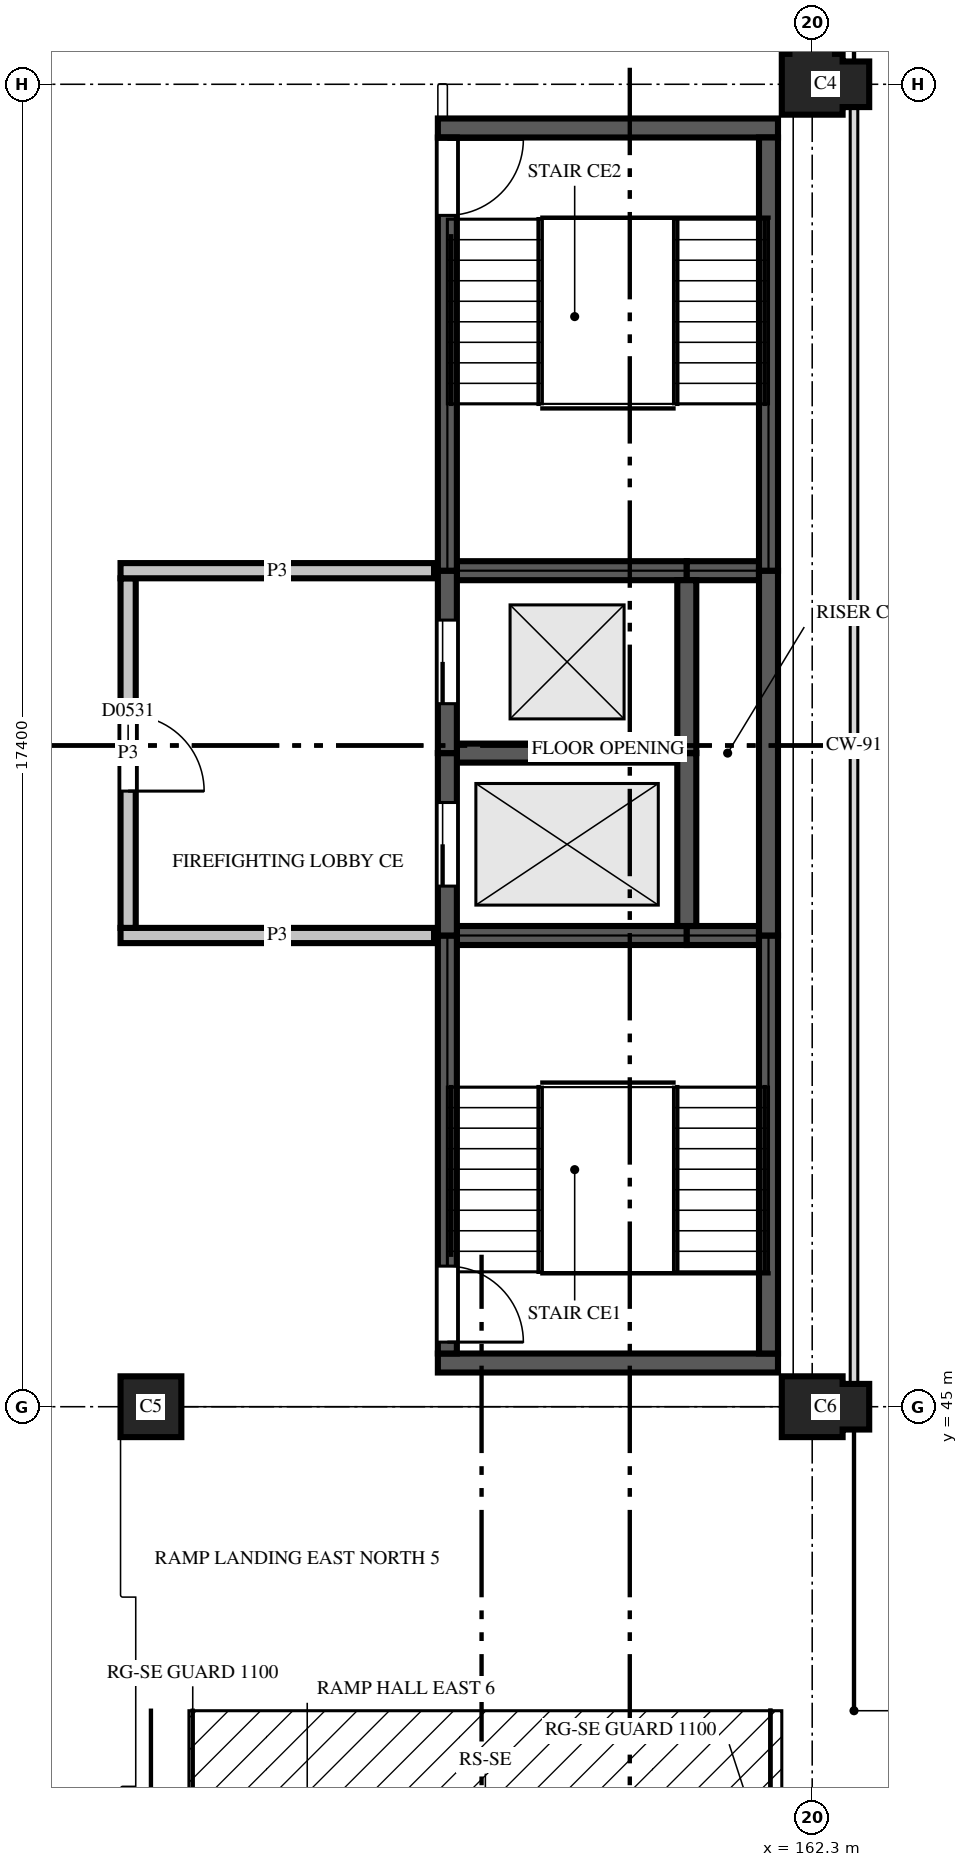
"""IFC4 building model, lengths in metres.
Left out: names, types, materials, properties, quantities, classifications, styles, units other than length and angle.
Written with IfcOpenShell. Run it as: python <this file> out.ifc"""

import sys

from ifc_helpers import new_model, si_unit, direction, frame, frame_2d, origin, place, context, subcontext, project, spatial, polyline, rectangle, outline, extrude, element, fill, save


model = new_model("IFC4")
c1 = context("Model", 3, precision=1e-05, world=origin(), true_north=direction((0.0, 1.0)))
c2 = subcontext(c1, "Body", "Model", "MODEL_VIEW")
j1 = project(units=[si_unit("LENGTHUNIT", "METRE"), si_unit("PLANEANGLEUNIT", "RADIAN")], contexts=[c1])
p1 = place(None, origin())
s1 = spatial("IfcSite", under=j1, at=p1, CompositionType="ELEMENT")
p2 = place(p1, origin())
s2 = spatial("IfcBuilding", under=s1, at=p2, CompositionType="ELEMENT")
p3 = place(p2, frame((0.0, 0.0, 19.3)))
s3 = spatial("IfcBuildingStorey", under=s2, at=p3, CompositionType="ELEMENT", Elevation=19.3)
p4 = place(p3, frame((153.6, 45.0, 0.0), z_axis=(0.0, 0.0, 1.0), x_axis=(1.0, 0.0, 0.0)))
e1 = element("IfcColumn", 1, at=p4, inside=s3, PredefinedType="COLUMN", context=c2, shape_type="SweptSolid", body=[
    extrude(outline(polyline([(-0.4, -0.4), (0.4, -0.4), (0.4, 0.4), (-0.4, 0.4), (-0.4, -0.4)])), origin(), (0.0, 0.0, 1.0), 3.7),
])
p5 = place(p3, frame((162.3, 45.0, 0.0), z_axis=(0.0, 0.0, 1.0), x_axis=(1.0, 0.0, 0.0)))
e2 = element("IfcColumn", 2, at=p5, inside=s3, PredefinedType="COLUMN", context=c2, shape_type="SweptSolid", body=[
    extrude(outline(polyline([(-0.4, -0.4), (0.4, -0.4), (0.4, -0.3), (0.75, -0.3), (0.75, 0.3), (0.4, 0.3), (0.4, 0.4), (-0.4, 0.4), (-0.4, -0.4)])), origin(), (0.0, 0.0, 1.0), 3.7),
])
p6 = place(p3, frame((162.3, 62.4, 0.0), z_axis=(0.0, 0.0, 1.0), x_axis=(1.0, 0.0, 0.0)))
e3 = element("IfcColumn", 3, at=p6, inside=s3, PredefinedType="COLUMN", context=c2, shape_type="SweptSolid", body=[
    extrude(outline(polyline([(-0.4, -0.4), (0.4, -0.4), (0.4, -0.3), (0.75, -0.3), (0.75, 0.3), (0.4, 0.3), (0.4, 0.4), (0.3, 0.4), (0.3, 0.75), (-0.3, 0.75), (-0.3, 0.4), (-0.4, 0.4), (-0.4, -0.4)])), origin(), (0.0, 0.0, 1.0), 3.7),
])
p7 = place(p3, frame((157.375, 45.575, 0.0), z_axis=(0.0, 0.0, 1.0), x_axis=(1.0, 0.0, 0.0)))
e4 = element("IfcWall", 4, at=p7, inside=s3, PredefinedType="SHEAR", context=c2, shape_type="SweptSolid", body=[
    extrude(rectangle(XDim=4.475, YDim=0.25, at=frame_2d((2.238, 0.0))), origin(), (0.0, 0.0, 1.0), 3.7),
])
p8 = place(p3, frame((157.625, 51.2, 0.0), z_axis=(0.0, 0.0, 1.0), x_axis=(1.0, 0.0, 0.0)))
e5 = element("IfcWall", 5, at=p8, inside=s3, PredefinedType="SHEAR", context=c2, shape_type="SweptSolid", body=[
    extrude(rectangle(XDim=3.025, YDim=0.25, at=frame_2d((1.512, 0.0))), origin(), (0.0, 0.0, 1.0), 3.7),
])
p9 = place(p3, frame((160.65, 51.2, 0.0), z_axis=(0.0, 0.0, 1.0), x_axis=(1.0, 0.0, 0.0)))
e6 = element("IfcWall", 6, at=p9, inside=s3, PredefinedType="SHEAR", context=c2, shape_type="SweptSolid", body=[
    extrude(rectangle(XDim=0.95, YDim=0.25, at=frame_2d((0.475, 0.0))), origin(), (0.0, 0.0, 1.0), 3.7),
])
p10 = place(p3, frame((157.625, 53.6, 0.0), z_axis=(0.0, 0.0, 1.0), x_axis=(1.0, 0.0, 0.0)))
e7 = element("IfcWall", 7, at=p10, inside=s3, PredefinedType="SHEAR", context=c2, shape_type="SweptSolid", body=[
    extrude(rectangle(XDim=2.9, YDim=0.25, at=frame_2d((1.45, 0.0))), origin(), (0.0, 0.0, 1.0), 3.7),
])
p11 = place(p3, frame((157.625, 56.0, 0.0), z_axis=(0.0, 0.0, 1.0), x_axis=(1.0, 0.0, 0.0)))
e8 = element("IfcWall", 8, at=p11, inside=s3, PredefinedType="SHEAR", context=c2, shape_type="SweptSolid", body=[
    extrude(rectangle(XDim=3.025, YDim=0.25, at=frame_2d((1.512, 0.0))), origin(), (0.0, 0.0, 1.0), 3.7),
])
p12 = place(p3, frame((160.65, 56.0, 0.0), z_axis=(0.0, 0.0, 1.0), x_axis=(1.0, 0.0, 0.0)))
e9 = element("IfcWall", 9, at=p12, inside=s3, PredefinedType="SHEAR", context=c2, shape_type="SweptSolid", body=[
    extrude(rectangle(XDim=0.95, YDim=0.25, at=frame_2d((0.475, 0.0))), origin(), (0.0, 0.0, 1.0), 3.7),
])
p13 = place(p3, frame((157.375, 61.825, 0.0), z_axis=(0.0, 0.0, 1.0), x_axis=(1.0, 0.0, 0.0)))
e10 = element("IfcWall", 10, at=p13, inside=s3, PredefinedType="SHEAR", context=c2, shape_type="SweptSolid", body=[
    extrude(rectangle(XDim=4.475, YDim=0.25, at=frame_2d((2.238, 0.0))), origin(), (0.0, 0.0, 1.0), 3.7),
])
p14 = place(p3, frame((157.5, 45.7, 0.0), z_axis=(0.0, 0.0, 1.0), x_axis=(0.0, 1.0, 0.0)))
e11 = element("IfcWall", 11, at=p14, inside=s3, PredefinedType="SHEAR", context=c2, shape_type="SweptSolid", body=[
    extrude(rectangle(XDim=5.5, YDim=0.25, at=frame_2d((2.75, 0.0))), origin(), (0.0, 0.0, 1.0), 3.7),
])
p15 = place(p14, frame((0.15, 0.0, 0.0)))
e12 = element("IfcOpeningElement", 12, at=p15, cuts=e11, PredefinedType="OPENING", context=c2, shape_type="SweptSolid", body=[
    extrude(rectangle(XDim=1.0, YDim=2.1, at=frame_2d((0.5, 1.05))), frame((0.0, 0.135, 0.0), z_axis=(0.0, -1.0, 0.0), x_axis=(1.0, 0.0, 0.0)), (0.0, 0.0, 1.0), 0.27),
])
p16 = place(p3, frame((157.5, 51.2, 0.0), z_axis=(0.0, 0.0, 1.0), x_axis=(0.0, 1.0, 0.0)))
e13 = element("IfcWall", 13, at=p16, inside=s3, PredefinedType="SHEAR", context=c2, shape_type="SweptSolid", body=[
    extrude(rectangle(XDim=2.4, YDim=0.25, at=frame_2d((1.2, 0.0))), origin(), (0.0, 0.0, 1.0), 3.7),
])
p17 = place(p16, frame((0.65, 0.0, 0.0)))
e14 = element("IfcOpeningElement", 14, at=p17, cuts=e13, PredefinedType="OPENING", context=c2, shape_type="SweptSolid", body=[
    extrude(rectangle(XDim=1.1, YDim=2.1, at=frame_2d((0.55, 1.05))), frame((0.0, 0.135, 0.0), z_axis=(0.0, -1.0, 0.0), x_axis=(1.0, 0.0, 0.0)), (0.0, 0.0, 1.0), 0.27),
])
p18 = place(p3, frame((157.5, 53.6, 0.0), z_axis=(0.0, 0.0, 1.0), x_axis=(0.0, 1.0, 0.0)))
e15 = element("IfcWall", 15, at=p18, inside=s3, PredefinedType="SHEAR", context=c2, shape_type="SweptSolid", body=[
    extrude(rectangle(XDim=2.4, YDim=0.25, at=frame_2d((1.2, 0.0))), origin(), (0.0, 0.0, 1.0), 3.7),
])
p19 = place(p18, frame((0.65, 0.0, 0.0)))
e16 = element("IfcOpeningElement", 16, at=p19, cuts=e15, PredefinedType="OPENING", context=c2, shape_type="SweptSolid", body=[
    extrude(rectangle(XDim=1.1, YDim=2.1, at=frame_2d((0.55, 1.05))), frame((0.0, 0.135, 0.0), z_axis=(0.0, -1.0, 0.0), x_axis=(1.0, 0.0, 0.0)), (0.0, 0.0, 1.0), 0.27),
])
p20 = place(p3, frame((157.5, 56.0, 0.0), z_axis=(0.0, 0.0, 1.0), x_axis=(0.0, 1.0, 0.0)))
e17 = element("IfcWall", 17, at=p20, inside=s3, PredefinedType="SHEAR", context=c2, shape_type="SweptSolid", body=[
    extrude(rectangle(XDim=5.7, YDim=0.25, at=frame_2d((2.85, 0.0))), origin(), (0.0, 0.0, 1.0), 3.7),
])
p21 = place(p20, frame((4.675, 0.0, 0.0)))
e18 = element("IfcOpeningElement", 18, at=p21, cuts=e17, PredefinedType="OPENING", context=c2, shape_type="SweptSolid", body=[
    extrude(rectangle(XDim=1.0, YDim=2.1, at=frame_2d((0.5, 1.05))), frame((0.0, 0.135, 0.0), z_axis=(0.0, -1.0, 0.0), x_axis=(1.0, 0.0, 0.0)), (0.0, 0.0, 1.0), 0.27),
])
p22 = place(p3, frame((160.65, 51.325, 0.0), z_axis=(0.0, 0.0, 1.0), x_axis=(0.0, 1.0, 0.0)))
e19 = element("IfcWall", 19, at=p22, inside=s3, PredefinedType="SHEAR", context=c2, shape_type="SweptSolid", body=[
    extrude(rectangle(XDim=2.275, YDim=0.25, at=frame_2d((1.138, 0.0))), origin(), (0.0, 0.0, 1.0), 3.7),
])
p23 = place(p3, frame((160.65, 53.6, 0.0), z_axis=(0.0, 0.0, 1.0), x_axis=(0.0, 1.0, 0.0)))
e20 = element("IfcWall", 20, at=p23, inside=s3, PredefinedType="SHEAR", context=c2, shape_type="SweptSolid", body=[
    extrude(rectangle(XDim=2.275, YDim=0.25, at=frame_2d((1.137, 0.0))), origin(), (0.0, 0.0, 1.0), 3.7),
])
p24 = place(p3, frame((161.725, 45.7, 0.0), z_axis=(0.0, 0.0, 1.0), x_axis=(0.0, 1.0, 0.0)))
e21 = element("IfcWall", 21, at=p24, inside=s3, PredefinedType="SHEAR", context=c2, shape_type="SweptSolid", body=[
    extrude(rectangle(XDim=5.5, YDim=0.25, at=frame_2d((2.75, 0.0))), origin(), (0.0, 0.0, 1.0), 3.7),
])
p25 = place(p3, frame((161.725, 51.2, 0.0), z_axis=(0.0, 0.0, 1.0), x_axis=(0.0, 1.0, 0.0)))
e22 = element("IfcWall", 22, at=p25, inside=s3, PredefinedType="SHEAR", context=c2, shape_type="SweptSolid", body=[
    extrude(rectangle(XDim=4.8, YDim=0.25, at=frame_2d((2.4, 0.0))), origin(), (0.0, 0.0, 1.0), 3.7),
])
p26 = place(p3, frame((161.725, 56.0, 0.0), z_axis=(0.0, 0.0, 1.0), x_axis=(0.0, 1.0, 0.0)))
e23 = element("IfcWall", 23, at=p26, inside=s3, PredefinedType="SHEAR", context=c2, shape_type="SweptSolid", body=[
    extrude(rectangle(XDim=5.7, YDim=0.25, at=frame_2d((2.85, 0.0))), origin(), (0.0, 0.0, 1.0), 3.7),
])
p27 = place(p3, frame((153.2, 51.2, 0.0), z_axis=(0.0, 0.0, 1.0), x_axis=(1.0, 0.0, 0.0)))
e24 = element("IfcWall", 24, at=p27, inside=s3, PredefinedType="PARTITIONING", context=c2, shape_type="SweptSolid", body=[
    extrude(rectangle(XDim=4.125, YDim=0.2, at=frame_2d((2.062, 0.0))), origin(), (0.0, 0.0, 1.0), 2.88),
])
p28 = place(p3, frame((153.3, 55.9, 0.0), z_axis=(0.0, 0.0, 1.0), x_axis=(0.0, -1.0, 0.0)))
e25 = element("IfcWall", 25, at=p28, inside=s3, PredefinedType="PARTITIONING", context=c2, shape_type="SweptSolid", body=[
    extrude(rectangle(XDim=4.6, YDim=0.2, at=frame_2d((2.3, 0.0))), origin(), (0.0, 0.0, 1.0), 2.88),
])
p29 = place(p28, frame((1.8, 0.0, 0.0)))
e26 = element("IfcOpeningElement", 26, at=p29, cuts=e25, PredefinedType="OPENING", context=c2, shape_type="SweptSolid", body=[
    extrude(rectangle(XDim=1.0, YDim=2.1, at=frame_2d((0.5, 1.05))), frame((0.0, 0.11, 0.0), z_axis=(0.0, -1.0, 0.0), x_axis=(1.0, 0.0, 0.0)), (0.0, 0.0, 1.0), 0.22),
])
p30 = place(p3, frame((157.325, 56.0, 0.0), z_axis=(0.0, 0.0, 1.0), x_axis=(-1.0, 0.0, 0.0)))
e27 = element("IfcWall", 27, at=p30, inside=s3, PredefinedType="PARTITIONING", context=c2, shape_type="SweptSolid", body=[
    extrude(rectangle(XDim=4.125, YDim=0.2, at=frame_2d((2.062, 0.0))), origin(), (0.0, 0.0, 1.0), 2.88),
])
p31 = place(p29, origin())
e28 = element("IfcDoor", 28, at=p31, inside=s3, OperationType="SINGLE_SWING_LEFT", PredefinedType="DOOR", context=c2, shape_type="SweptSolid", body=[
    extrude(rectangle(XDim=1.0, YDim=2.1, at=frame_2d((0.5, 1.05))), frame((0.0, 0.025, 0.0), z_axis=(0.0, -1.0, 0.0), x_axis=(1.0, 0.0, 0.0)), (0.0, 0.0, 1.0), 0.05),
])
fill(e26, e28)
p32 = place(p17, origin())
e29 = element("IfcDoor", 29, at=p32, inside=s3, OperationType="SLIDING_TO_LEFT", PredefinedType="DOOR", context=c2, shape_type="SweptSolid", body=[
    extrude(rectangle(XDim=1.1, YDim=2.1, at=frame_2d((0.55, 1.05))), frame((0.0, 0.025, 0.0), z_axis=(0.0, -1.0, 0.0), x_axis=(1.0, 0.0, 0.0)), (0.0, 0.0, 1.0), 0.05),
])
fill(e14, e29)
p33 = place(p19, origin())
e30 = element("IfcDoor", 30, at=p33, inside=s3, OperationType="SLIDING_TO_LEFT", PredefinedType="DOOR", context=c2, shape_type="SweptSolid", body=[
    extrude(rectangle(XDim=1.1, YDim=2.1, at=frame_2d((0.55, 1.05))), frame((0.0, 0.025, 0.0), z_axis=(0.0, -1.0, 0.0), x_axis=(1.0, 0.0, 0.0)), (0.0, 0.0, 1.0), 0.05),
])
fill(e16, e30)
p34 = place(p21, origin())
e31 = element("IfcDoor", 31, at=p34, inside=s3, OperationType="SINGLE_SWING_RIGHT", PredefinedType="DOOR", context=c2, shape_type="SweptSolid", body=[
    extrude(rectangle(XDim=1.0, YDim=2.1, at=frame_2d((0.5, 1.05))), frame((0.0, 0.025, 0.0), z_axis=(0.0, -1.0, 0.0), x_axis=(1.0, 0.0, 0.0)), (0.0, 0.0, 1.0), 0.05),
])
fill(e18, e31)
p35 = place(p15, origin())
e32 = element("IfcDoor", 32, at=p35, inside=s3, OperationType="SINGLE_SWING_LEFT", PredefinedType="DOOR", context=c2, shape_type="SweptSolid", body=[
    extrude(rectangle(XDim=1.0, YDim=2.1, at=frame_2d((0.5, 1.05))), frame((0.0, 0.025, 0.0), z_axis=(0.0, -1.0, 0.0), x_axis=(1.0, 0.0, 0.0)), (0.0, 0.0, 1.0), 0.05),
])
fill(e12, e32)
save(model, sys.argv[1])
